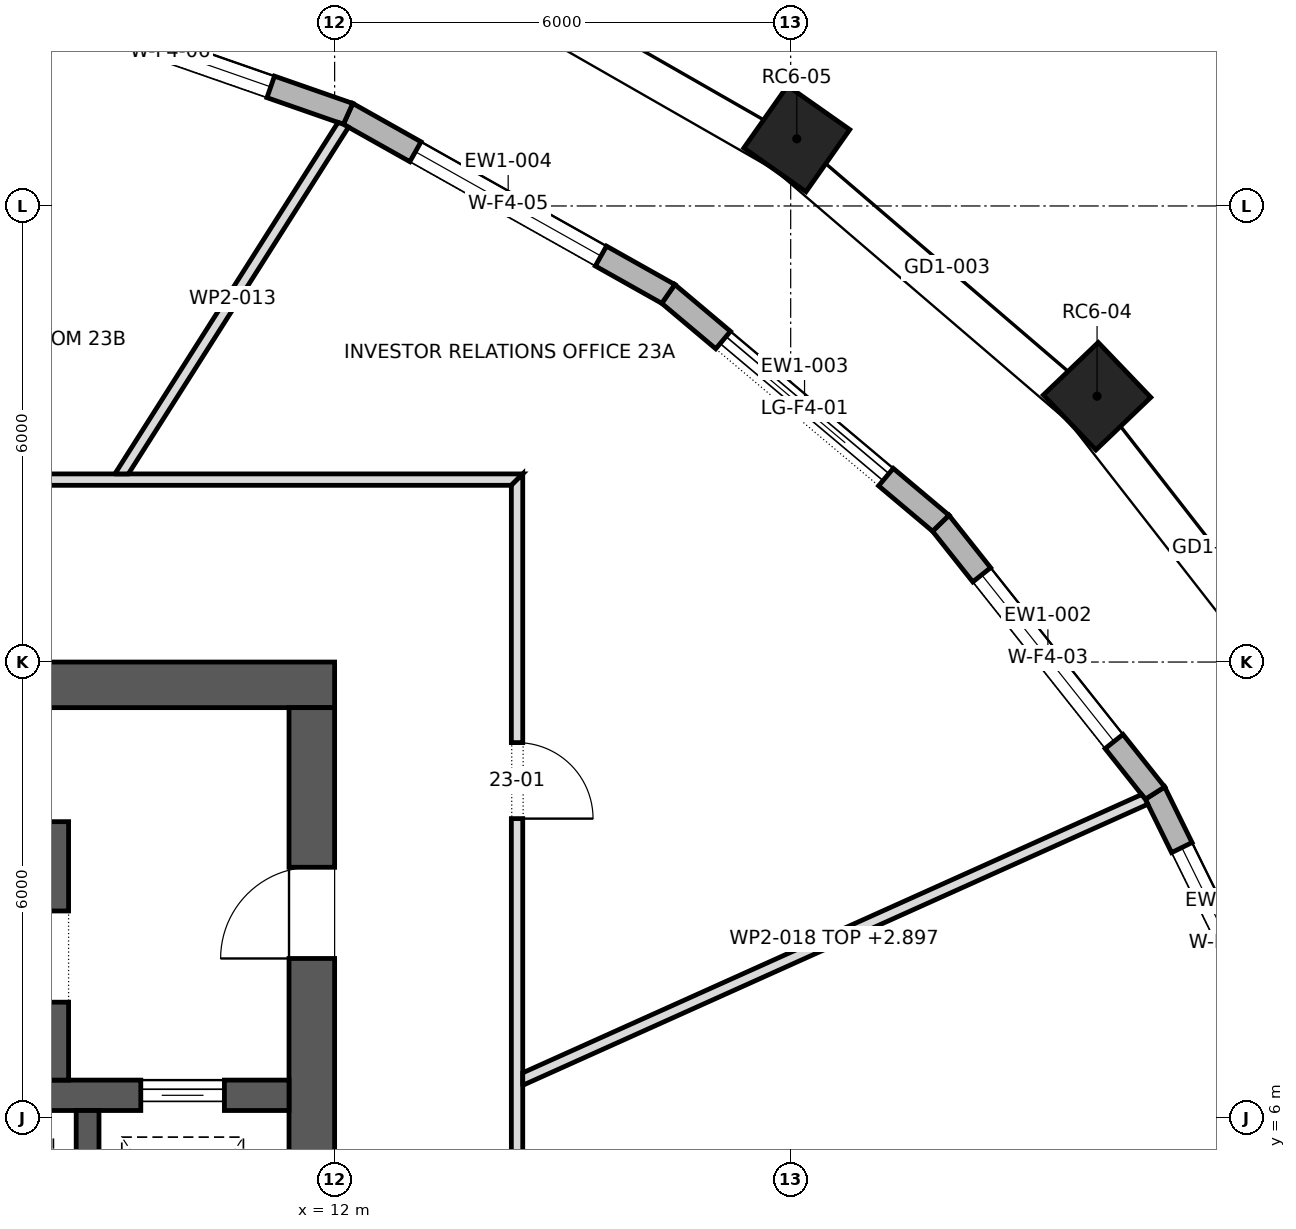
"""IFC4 building model, lengths in metres.
Left out: names, types, materials, properties, quantities, classifications, styles, units other than length and angle.
Written with IfcOpenShell. Run it as: python <this file> out.ifc"""

import sys

from ifc_helpers import new_model, si_unit, direction, frame, frame_2d, origin, origin_2d, place, context, subcontext, project, spatial, polyline, rectangle, outline, extrude, element, fill, save


model = new_model("IFC4")
c1 = context("Model", 3, precision=1e-05, world=origin(), true_north=direction((0.0, 1.0)))
c2 = subcontext(c1, "Body", "Model", "MODEL_VIEW")
j1 = project(units=[si_unit("LENGTHUNIT", "METRE"), si_unit("PLANEANGLEUNIT", "RADIAN")], contexts=[c1])
p1 = place(None, origin())
s1 = spatial("IfcSite", under=j1, at=p1, CompositionType="ELEMENT")
p2 = place(p1, origin())
s2 = spatial("IfcBuilding", under=s1, at=p2, CompositionType="ELEMENT")
p3 = place(p2, frame((0.0, 0.0, 324.3)))
s3 = spatial("IfcBuildingStorey", under=s2, at=p3, CompositionType="ELEMENT", Elevation=324.3)
for number, where, z_axis, x_axis in (
    (1, (22.031, 15.497, 0.0), (0.0, 0.0, 1.0), (-0.692, 0.722, 0.0)),
    (2, (18.08, 18.884, 0.0), (0.0, 0.0, 1.0), (-0.818, 0.575, 0.0)),
):
    element("IfcColumn", number, at=place(p3, frame(where, z_axis=z_axis, x_axis=x_axis)), inside=s3, PredefinedType="COLUMN", context=c2, shape_type="SweptSolid", body=[
        extrude(rectangle(XDim=1.0, YDim=1.0, at=origin_2d()), origin(), (0.0, 0.0, 1.0), 4.0),
    ])
p4 = place(p3, frame((-12.0, 11.7, 0.0), z_axis=(0.0, 0.0, 1.0), x_axis=(1.0, 0.0, 0.0)))
e3 = element("IfcWall", 3, at=p4, inside=s3, PredefinedType="SHEAR", context=c2, shape_type="SweptSolid", body=[
    extrude(rectangle(XDim=24.0, YDim=0.6, at=frame_2d((12.0, 0.0))), origin(), (0.0, 0.0, 1.0), 4.0),
])
p5 = place(p4, frame((9.975, 0.0, 0.0)))
e4 = element("IfcOpeningElement", 4, at=p5, cuts=e3, PredefinedType="OPENING", context=c2, shape_type="SweptSolid", body=[
    extrude(rectangle(XDim=0.9, YDim=2.1, at=frame_2d((0.45, 1.05))), frame((0.0, 0.312, 0.0), z_axis=(0.0, -1.0, 0.0), x_axis=(1.0, 0.0, 0.0)), (0.0, 0.0, 1.0), 0.624),
])
p6 = place(p4, frame((3.6, 0.0, 0.0)))
e5 = element("IfcOpeningElement", 5, at=p6, cuts=e3, PredefinedType="OPENING", context=c2, shape_type="SweptSolid", body=[
    extrude(rectangle(XDim=0.8, YDim=2.1, at=frame_2d((0.4, 1.05))), frame((0.0, 0.312, 0.0), z_axis=(0.0, -1.0, 0.0), x_axis=(1.0, 0.0, 0.0)), (0.0, 0.0, 1.0), 0.624),
])
p7 = place(p4, frame((6.2, 0.0, 0.0)))
e6 = element("IfcOpeningElement", 6, at=p7, cuts=e3, PredefinedType="OPENING", context=c2, shape_type="SweptSolid", body=[
    extrude(rectangle(XDim=0.8, YDim=2.1, at=frame_2d((0.4, 1.05))), frame((0.0, 0.312, 0.0), z_axis=(0.0, -1.0, 0.0), x_axis=(1.0, 0.0, 0.0)), (0.0, 0.0, 1.0), 0.624),
])
p8 = place(p4, frame((15.85, 0.0, 0.0)))
e7 = element("IfcOpeningElement", 7, at=p8, cuts=e3, PredefinedType="OPENING", context=c2, shape_type="SweptSolid", body=[
    extrude(rectangle(XDim=0.8, YDim=2.1, at=frame_2d((0.4, 1.05))), frame((0.0, 0.312, 0.0), z_axis=(0.0, -1.0, 0.0), x_axis=(1.0, 0.0, 0.0)), (0.0, 0.0, 1.0), 0.624),
])
p9 = place(p3, frame((11.7, -11.4, 0.0), z_axis=(0.0, 0.0, 1.0), x_axis=(0.0, 1.0, 0.0)))
e8 = element("IfcWall", 8, at=p9, inside=s3, PredefinedType="SHEAR", context=c2, shape_type="SweptSolid", body=[
    extrude(rectangle(XDim=22.8, YDim=0.6, at=frame_2d((11.4, 0.0))), origin(), (0.0, 0.0, 1.0), 4.0),
])
p10 = place(p9, frame((10.2, 0.0, 0.0)))
e9 = element("IfcOpeningElement", 9, at=p10, cuts=e8, PredefinedType="OPENING", context=c2, shape_type="SweptSolid", body=[
    extrude(rectangle(XDim=2.4, YDim=2.1, at=frame_2d((1.2, 1.05))), frame((0.0, 0.312, 0.0), z_axis=(0.0, -1.0, 0.0), x_axis=(1.0, 0.0, 0.0)), (0.0, 0.0, 1.0), 0.624),
])
p11 = place(p9, frame((19.5, 0.0, 0.0)))
e10 = element("IfcOpeningElement", 10, at=p11, cuts=e8, PredefinedType="OPENING", context=c2, shape_type="SweptSolid", body=[
    extrude(rectangle(XDim=1.2, YDim=2.1, at=frame_2d((0.6, 1.05))), frame((0.0, 0.312, 0.0), z_axis=(0.0, -1.0, 0.0), x_axis=(1.0, 0.0, 0.0)), (0.0, 0.0, 1.0), 0.624),
])
p12 = place(p9, frame((2.1, 0.0, 0.0)))
e11 = element("IfcOpeningElement", 11, at=p12, cuts=e8, PredefinedType="OPENING", context=c2, shape_type="SweptSolid", body=[
    extrude(rectangle(XDim=1.2, YDim=2.1, at=frame_2d((0.6, 1.05))), frame((0.0, 0.312, 0.0), z_axis=(0.0, -1.0, 0.0), x_axis=(1.0, 0.0, 0.0)), (0.0, 0.0, 1.0), 0.624),
])
p13 = place(p3, frame((-11.4, 6.3, 0.0), z_axis=(0.0, 0.0, 1.0), x_axis=(1.0, 0.0, 0.0)))
e12 = element("IfcWall", 12, at=p13, inside=s3, PredefinedType="SHEAR", context=c2, shape_type="SweptSolid", body=[
    extrude(rectangle(XDim=22.8, YDim=0.4, at=frame_2d((11.4, 0.0))), origin(), (0.0, 0.0, 1.0), 4.0),
])
p14 = place(p13, frame((20.85, 0.0, 0.0)))
e13 = element("IfcOpeningElement", 13, at=p14, cuts=e12, PredefinedType="OPENING", context=c2, shape_type="SweptSolid", body=[
    extrude(rectangle(XDim=1.1, YDim=2.1, at=frame_2d((0.55, 1.05))), frame((0.0, 0.212, 0.0), z_axis=(0.0, -1.0, 0.0), x_axis=(1.0, 0.0, 0.0)), (0.0, 0.0, 1.0), 0.424),
])
p15 = place(p3, frame((8.75, 3.2, 0.0), z_axis=(0.0, 0.0, 1.0), x_axis=(0.0, 1.0, 0.0)))
e14 = element("IfcWall", 14, at=p15, inside=s3, PredefinedType="SHEAR", context=c2, shape_type="SweptSolid", body=[
    extrude(rectangle(XDim=2.9, YDim=0.3, at=frame_2d((1.45, 0.0))), origin(), (0.0, 0.0, 1.0), 4.0),
])
p16 = place(p3, frame((24.736, 6.33, 0.0), z_axis=(0.0, 0.0, 1.0), x_axis=(-0.441610485853, 0.897206876247, 0.0)))
e15 = element("IfcWall", 15, at=p16, inside=s3, PredefinedType="STANDARD", context=c2, shape_type="SweptSolid", body=[
    extrude(outline(polyline([(-0.017, -0.15), (4.415, -0.15), (4.383, 0.15), (0.017, 0.15), (-0.017, -0.15)])), origin(), (0.0, 0.0, 1.0), 3.65),
])
p17 = place(p16, frame((0.8, 0.0, 0.6)))
e16 = element("IfcOpeningElement", 16, at=p17, cuts=e15, PredefinedType="OPENING", context=c2, shape_type="SweptSolid", body=[
    extrude(rectangle(XDim=2.8, YDim=2.65, at=frame_2d((1.4, 1.325))), frame((0.0, 0.162, 0.0), z_axis=(0.0, -1.0, 0.0), x_axis=(1.0, 0.0, 0.0)), (0.0, 0.0, 1.0), 0.324),
])
p18 = place(p3, frame((22.793, 10.276, 0.0), z_axis=(0.0, 0.0, 1.0), x_axis=(-0.621800530555, 0.783175650925, 0.0)))
e17 = element("IfcWall", 17, at=p18, inside=s3, PredefinedType="STANDARD", context=c2, shape_type="SweptSolid", body=[
    extrude(outline(polyline([(-0.016, -0.15), (4.548, -0.15), (4.517, 0.15), (0.016, 0.15), (-0.016, -0.15)])), origin(), (0.0, 0.0, 1.0), 3.65),
])
p19 = place(p18, frame((0.866, 0.0, 0.6)))
e18 = element("IfcOpeningElement", 18, at=p19, cuts=e17, PredefinedType="OPENING", context=c2, shape_type="SweptSolid", body=[
    extrude(rectangle(XDim=2.8, YDim=2.65, at=frame_2d((1.4, 1.325))), frame((0.0, 0.162, 0.0), z_axis=(0.0, -1.0, 0.0), x_axis=(1.0, 0.0, 0.0)), (0.0, 0.0, 1.0), 0.324),
])
p20 = place(p3, frame((19.975, 13.826, 0.0), z_axis=(0.0, 0.0, 1.0), x_axis=(-0.765128700347, 0.643877373344, 0.0)))
e19 = element("IfcWall", 19, at=p20, inside=s3, PredefinedType="STANDARD", context=c2, shape_type="SweptSolid", body=[
    extrude(outline(polyline([(-0.015, -0.15), (4.7, -0.15), (4.671, 0.15), (0.015, 0.15), (-0.015, -0.15)])), origin(), (0.0, 0.0, 1.0), 3.65),
])
p21 = place(p20, frame((0.943, 0.0, 0.0)))
e20 = element("IfcOpeningElement", 20, at=p21, cuts=e19, PredefinedType="OPENING", context=c2, shape_type="SweptSolid", body=[
    extrude(rectangle(XDim=2.8, YDim=3.25, at=frame_2d((1.4, 1.625))), frame((0.0, 0.162, 0.0), z_axis=(0.0, -1.0, 0.0), x_axis=(1.0, 0.0, 0.0)), (0.0, 0.0, 1.0), 0.324),
])
p22 = place(p3, frame((16.39, 16.843, 0.0), z_axis=(0.0, 0.0, 1.0), x_axis=(-0.871651071333, 0.49012693238, 0.0)))
e21 = element("IfcWall", 21, at=p22, inside=s3, PredefinedType="STANDARD", context=c2, shape_type="SweptSolid", body=[
    extrude(outline(polyline([(-0.014, -0.15), (4.846, -0.15), (4.82, 0.15), (0.014, 0.15), (-0.014, -0.15)])), origin(), (0.0, 0.0, 1.0), 3.65),
])
p23 = place(p22, frame((1.017, 0.0, 0.6)))
e22 = element("IfcOpeningElement", 22, at=p23, cuts=e21, PredefinedType="OPENING", context=c2, shape_type="SweptSolid", body=[
    extrude(rectangle(XDim=2.8, YDim=2.65, at=frame_2d((1.4, 1.325))), frame((0.0, 0.162, 0.0), z_axis=(0.0, -1.0, 0.0), x_axis=(1.0, 0.0, 0.0)), (0.0, 0.0, 1.0), 0.324),
])
p24 = place(p3, frame((12.177, 19.212, 0.0), z_axis=(0.0, 0.0, 1.0), x_axis=(-0.944273917508, 0.329160703479, 0.0)))
e23 = element("IfcWall", 23, at=p24, inside=s3, PredefinedType="STANDARD", context=c2, shape_type="SweptSolid", body=[
    extrude(outline(polyline([(-0.013, -0.15), (4.968, -0.15), (4.943, 0.15), (0.013, 0.15), (-0.013, -0.15)])), origin(), (0.0, 0.0, 1.0), 3.65),
])
p25 = place(p24, frame((1.078, 0.0, 0.6)))
e24 = element("IfcOpeningElement", 24, at=p25, cuts=e23, PredefinedType="OPENING", context=c2, shape_type="SweptSolid", body=[
    extrude(rectangle(XDim=2.8, YDim=2.65, at=frame_2d((1.4, 1.325))), frame((0.0, 0.162, 0.0), z_axis=(0.0, -1.0, 0.0), x_axis=(1.0, 0.0, 0.0)), (0.0, 0.0, 1.0), 0.324),
])
p26 = place(p3, frame((8.375, 6.5, 0.0), z_axis=(0.0, 0.0, 1.0), x_axis=(0.0, 1.0, 0.0)))
e25 = element("IfcWall", 25, at=p26, inside=s3, PredefinedType="SHEAR", context=c2, shape_type="SweptSolid", body=[
    extrude(rectangle(XDim=3.4, YDim=0.25, at=frame_2d((1.7, 0.0))), origin(), (0.0, 0.0, 1.0), 3.65),
])
p27 = place(p26, frame((1.025, 0.0, 0.0)))
e26 = element("IfcOpeningElement", 26, at=p27, cuts=e25, PredefinedType="OPENING", context=c2, shape_type="SweptSolid", body=[
    extrude(rectangle(XDim=1.2, YDim=2.1, at=frame_2d((0.6, 1.05))), frame((0.0, 0.137, 0.0), z_axis=(0.0, -1.0, 0.0), x_axis=(1.0, 0.0, 0.0)), (0.0, 0.0, 1.0), 0.274),
])
p28 = place(p3, frame((-14.475, 14.4, 0.0), z_axis=(0.0, 0.0, 1.0), x_axis=(1.0, 0.0, 0.0)))
e27 = element("IfcWall", 27, at=p28, inside=s3, PredefinedType="PARTITIONING", context=c2, shape_type="SweptSolid", body=[
    extrude(outline(polyline([(0.15, -0.075), (2.06, -0.075), (3.97, -0.075), (5.88, -0.075), (7.79, -0.075), (9.7, -0.075), (11.61, -0.075), (13.52, -0.075), (15.43, -0.075), (17.34, -0.075), (19.25, -0.075), (21.16, -0.075), (23.07, -0.075), (24.98, -0.075), (26.89, -0.075), (28.8, -0.075), (28.95, 0.075), (27.02, 0.075), (25.09, 0.075), (23.16, 0.075), (21.23, 0.075), (19.3, 0.075), (17.37, 0.075), (15.44, 0.075), (13.51, 0.075), (11.58, 0.075), (9.65, 0.075), (7.72, 0.075), (5.79, 0.075), (3.86, 0.075), (1.93, 0.075), (0.0, 0.075), (0.15, -0.075)])), origin(), (0.0, 0.0, 1.0), 3.65),
])
p29 = place(p28, frame((17.705, 0.0, 0.0)))
e28 = element("IfcOpeningElement", 28, at=p29, cuts=e27, PredefinedType="OPENING", context=c2, shape_type="SweptSolid", body=[
    extrude(rectangle(XDim=1.0, YDim=2.1, at=frame_2d((0.5, 1.05))), frame((0.0, 0.087, 0.0), z_axis=(0.0, -1.0, 0.0), x_axis=(1.0, 0.0, 0.0)), (0.0, 0.0, 1.0), 0.174),
])
p30 = place(p28, frame((8.555, 0.0, 0.0)))
e29 = element("IfcOpeningElement", 29, at=p30, cuts=e27, PredefinedType="OPENING", context=c2, shape_type="SweptSolid", body=[
    extrude(rectangle(XDim=1.0, YDim=2.1, at=frame_2d((0.5, 1.05))), frame((0.0, 0.087, 0.0), z_axis=(0.0, -1.0, 0.0), x_axis=(1.0, 0.0, 0.0)), (0.0, 0.0, 1.0), 0.174),
])
p31 = place(p3, frame((9.172, 14.435, 0.0), z_axis=(0.0, 0.0, 1.0), x_axis=(0.536016173419, 0.844207712493, 0.0)))
e30 = element("IfcWall", 30, at=p31, inside=s3, PredefinedType="PARTITIONING", context=c2, shape_type="SweptSolid", body=[
    extrude(outline(polyline([(0.095, -0.075), (1.896, -0.075), (3.697, -0.075), (5.498, -0.075), (5.494, 0.003), (5.477, 0.075), (3.651, 0.075), (1.826, 0.075), (0.0, 0.075), (0.0, 0.074), (0.095, -0.075)])), origin(), (0.0, 0.0, 1.0), 3.65),
])
p32 = place(p3, frame((14.4, -14.475, 0.0), z_axis=(0.0, 0.0, 1.0), x_axis=(0.0, 1.0, 0.0)))
e31 = element("IfcWall", 31, at=p32, inside=s3, PredefinedType="PARTITIONING", context=c2, shape_type="SweptSolid", body=[
    extrude(outline(polyline([(0.0, -0.075), (1.93, -0.075), (3.86, -0.075), (5.79, -0.075), (7.72, -0.075), (9.65, -0.075), (11.58, -0.075), (13.51, -0.075), (15.44, -0.075), (17.37, -0.075), (19.3, -0.075), (21.23, -0.075), (23.16, -0.075), (25.09, -0.075), (27.02, -0.075), (28.95, -0.075), (28.8, 0.075), (26.89, 0.075), (24.98, 0.075), (23.07, 0.075), (21.16, 0.075), (19.25, 0.075), (17.34, 0.075), (15.43, 0.075), (13.52, 0.075), (11.61, 0.075), (9.7, 0.075), (7.79, 0.075), (5.88, 0.075), (3.97, 0.075), (2.06, 0.075), (0.15, 0.075), (0.0, -0.075)])), origin(), (0.0, 0.0, 1.0), 3.65),
])
p33 = place(p32, frame((24.415, 0.0, 0.0)))
e32 = element("IfcOpeningElement", 32, at=p33, cuts=e31, PredefinedType="OPENING", context=c2, shape_type="SweptSolid", body=[
    extrude(rectangle(XDim=1.0, YDim=2.1, at=frame_2d((0.5, 1.05))), frame((0.0, 0.087, 0.0), z_axis=(0.0, -1.0, 0.0), x_axis=(1.0, 0.0, 0.0)), (0.0, 0.0, 1.0), 0.174),
])
p34 = place(p32, frame((3.535, 0.0, 0.0)))
e33 = element("IfcOpeningElement", 33, at=p34, cuts=e31, PredefinedType="OPENING", context=c2, shape_type="SweptSolid", body=[
    extrude(rectangle(XDim=1.0, YDim=2.1, at=frame_2d((0.5, 1.05))), frame((0.0, 0.087, 0.0), z_axis=(0.0, -1.0, 0.0), x_axis=(1.0, 0.0, 0.0)), (0.0, 0.0, 1.0), 0.174),
])
p35 = place(p32, frame((10.14, 0.0, 0.0)))
e34 = element("IfcOpeningElement", 34, at=p35, cuts=e31, PredefinedType="OPENING", context=c2, shape_type="SweptSolid", body=[
    extrude(rectangle(XDim=1.0, YDim=2.1, at=frame_2d((0.5, 1.05))), frame((0.0, 0.087, 0.0), z_axis=(0.0, -1.0, 0.0), x_axis=(1.0, 0.0, 0.0)), (0.0, 0.0, 1.0), 0.174),
])
p36 = place(p32, frame((16.62, 0.0, 0.0)))
e35 = element("IfcOpeningElement", 35, at=p36, cuts=e31, PredefinedType="OPENING", context=c2, shape_type="SweptSolid", body=[
    extrude(rectangle(XDim=1.0, YDim=2.1, at=frame_2d((0.5, 1.05))), frame((0.0, 0.087, 0.0), z_axis=(0.0, -1.0, 0.0), x_axis=(1.0, 0.0, 0.0)), (0.0, 0.0, 1.0), 0.174),
])
p37 = place(p3, frame((22.667, 10.197, 0.0), z_axis=(0.0, 0.0, 1.0), x_axis=(-0.912043070278, -0.410094425662, 0.0)))
e36 = element("IfcWall", 36, at=p37, inside=s3, PredefinedType="PARTITIONING", context=c2, shape_type="SweptSolid", body=[
    extrude(outline(polyline([(0.021, -0.075), (1.807, -0.075), (3.592, -0.075), (5.378, -0.075), (7.163, -0.075), (8.948, -0.075), (9.016, 0.074), (9.016, 0.075), (7.212, 0.075), (5.409, 0.075), (3.606, 0.075), (1.803, 0.075), (0.0, 0.075), (0.0, 0.066), (0.002, 0.001), (0.021, -0.075)])), origin(), (0.0, 0.0, 1.0), 2.897),
])
p38 = place(p17, origin())
e37 = element("IfcWindow", 37, at=p38, inside=s3, PartitioningType="DOUBLE_PANEL_VERTICAL", PredefinedType="WINDOW", context=c2, shape_type="SweptSolid", body=[
    extrude(rectangle(XDim=2.8, YDim=2.65, at=frame_2d((1.4, 1.325))), frame((0.0, 0.03, 0.0), z_axis=(0.0, -1.0, 0.0), x_axis=(1.0, 0.0, 0.0)), (0.0, 0.0, 1.0), 0.06),
])
fill(e16, e37)
p39 = place(p19, origin())
e38 = element("IfcWindow", 38, at=p39, inside=s3, PartitioningType="DOUBLE_PANEL_VERTICAL", PredefinedType="WINDOW", context=c2, shape_type="SweptSolid", body=[
    extrude(rectangle(XDim=2.8, YDim=2.65, at=frame_2d((1.4, 1.325))), frame((0.0, 0.03, 0.0), z_axis=(0.0, -1.0, 0.0), x_axis=(1.0, 0.0, 0.0)), (0.0, 0.0, 1.0), 0.06),
])
fill(e18, e38)
p40 = place(p21, origin())
e39 = element("IfcDoor", 39, at=p40, inside=s3, OperationType="DOUBLE_DOOR_SLIDING", PredefinedType="DOOR", context=c2, shape_type="SweptSolid", body=[
    extrude(rectangle(XDim=2.8, YDim=3.25, at=frame_2d((1.4, 1.625))), frame((0.0, 0.025, 0.0), z_axis=(0.0, -1.0, 0.0), x_axis=(1.0, 0.0, 0.0)), (0.0, 0.0, 1.0), 0.05),
])
fill(e20, e39)
p41 = place(p23, origin())
e40 = element("IfcWindow", 40, at=p41, inside=s3, PartitioningType="DOUBLE_PANEL_VERTICAL", PredefinedType="WINDOW", context=c2, shape_type="SweptSolid", body=[
    extrude(rectangle(XDim=2.8, YDim=2.65, at=frame_2d((1.4, 1.325))), frame((0.0, 0.03, 0.0), z_axis=(0.0, -1.0, 0.0), x_axis=(1.0, 0.0, 0.0)), (0.0, 0.0, 1.0), 0.06),
])
fill(e22, e40)
p42 = place(p25, origin())
e41 = element("IfcWindow", 41, at=p42, inside=s3, PartitioningType="DOUBLE_PANEL_VERTICAL", PredefinedType="WINDOW", context=c2, shape_type="SweptSolid", body=[
    extrude(rectangle(XDim=2.8, YDim=2.65, at=frame_2d((1.4, 1.325))), frame((0.0, 0.03, 0.0), z_axis=(0.0, -1.0, 0.0), x_axis=(1.0, 0.0, 0.0)), (0.0, 0.0, 1.0), 0.06),
])
fill(e24, e41)
p43 = place(p14, origin())
e42 = element("IfcDoor", 42, at=p43, inside=s3, OperationType="SLIDING_TO_LEFT", PredefinedType="DOOR", context=c2, shape_type="SweptSolid", body=[
    extrude(rectangle(XDim=1.1, YDim=2.1, at=frame_2d((0.55, 1.05))), frame((0.0, 0.025, 0.0), z_axis=(0.0, -1.0, 0.0), x_axis=(1.0, 0.0, 0.0)), (0.0, 0.0, 1.0), 0.05),
])
fill(e13, e42)
p44 = place(p27, origin())
e43 = element("IfcDoor", 43, at=p44, inside=s3, OperationType="SINGLE_SWING_RIGHT", PredefinedType="DOOR", context=c2, shape_type="SweptSolid", body=[
    extrude(rectangle(XDim=1.2, YDim=2.1, at=frame_2d((0.6, 1.05))), frame((0.0, 0.025, 0.0), z_axis=(0.0, -1.0, 0.0), x_axis=(1.0, 0.0, 0.0)), (0.0, 0.0, 1.0), 0.05),
])
fill(e26, e43)
p45 = place(p11, origin())
e44 = element("IfcDoor", 44, at=p45, inside=s3, OperationType="SINGLE_SWING_RIGHT", PredefinedType="DOOR", context=c2, shape_type="SweptSolid", body=[
    extrude(rectangle(XDim=1.2, YDim=2.1, at=frame_2d((0.6, 1.05))), frame((0.0, 0.025, 0.0), z_axis=(0.0, -1.0, 0.0), x_axis=(1.0, 0.0, 0.0)), (0.0, 0.0, 1.0), 0.05),
])
fill(e10, e44)
p46 = place(p33, frame((1.0, 0.0, 0.0), z_axis=(0.0, 0.0, 1.0), x_axis=(-1.0, 0.0, 0.0)))
e45 = element("IfcDoor", 45, at=p46, inside=s3, OperationType="SINGLE_SWING_LEFT", PredefinedType="DOOR", context=c2, shape_type="SweptSolid", body=[
    extrude(rectangle(XDim=1.0, YDim=2.1, at=frame_2d((0.5, 1.05))), frame((0.0, 0.025, 0.0), z_axis=(0.0, -1.0, 0.0), x_axis=(1.0, 0.0, 0.0)), (0.0, 0.0, 1.0), 0.05),
])
fill(e32, e45)
save(model, sys.argv[1])
